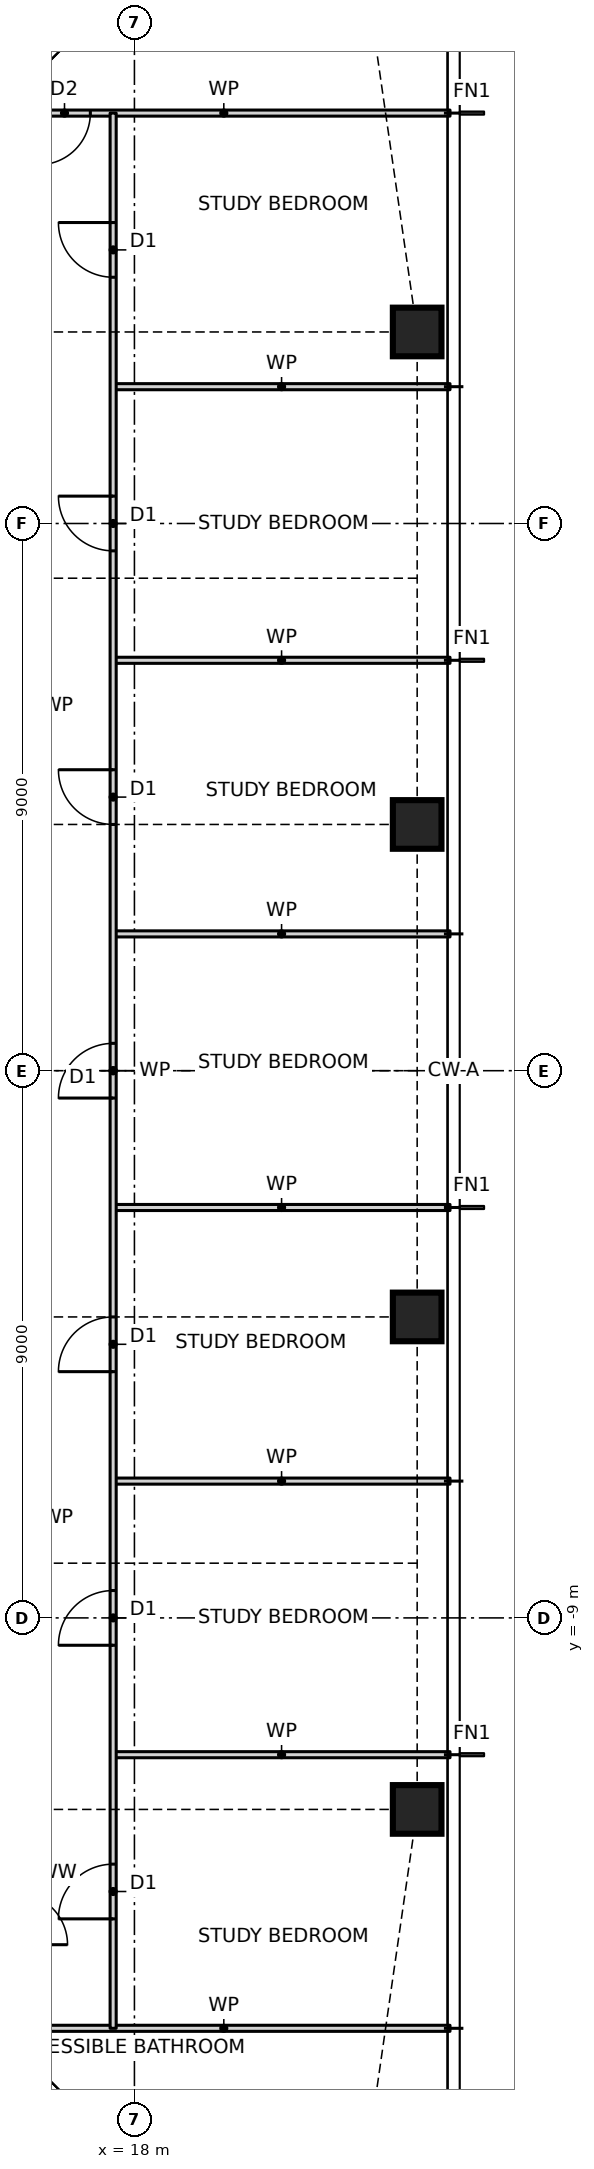
"""IFC4 building model, lengths in metres.
Left out: names, types, materials, properties, quantities, classifications, styles, units other than length and angle.
Written with IfcOpenShell. Run it as: python <this file> out.ifc"""

import sys

from ifc_helpers import new_model, si_unit, direction, frame, frame_2d, origin, origin_2d, place, context, subcontext, project, spatial, rectangle, hollow_rectangle, extrude, element, fill, save


model = new_model("IFC4")
c1 = context("Model", 3, precision=1e-05, world=origin(), true_north=direction((0.0, 1.0)))
c2 = subcontext(c1, "Body", "Model", "MODEL_VIEW")
j1 = project(units=[si_unit("LENGTHUNIT", "METRE"), si_unit("PLANEANGLEUNIT", "RADIAN")], contexts=[c1])
p1 = place(None, origin())
s1 = spatial("IfcSite", under=j1, at=p1, CompositionType="ELEMENT")
p2 = place(p1, origin())
s2 = spatial("IfcBuilding", under=s1, at=p2, CompositionType="ELEMENT")
p3 = place(p2, frame((0.0, 0.0, 22.0)))
s3 = spatial("IfcBuildingStorey", under=s2, at=p3, CompositionType="ELEMENT", Elevation=22.0)
for number, where, z_axis, x_axis in (
    (1, (22.65, -12.15, 0.0), (0.0, 0.0, 1.0), (1.0, 0.0, 0.0)),
    (2, (22.65, -4.05, 0.0), (0.0, 0.0, 1.0), (1.0, 0.0, 0.0)),
    (3, (22.65, 4.05, 0.0), (0.0, 0.0, 1.0), (1.0, 0.0, 0.0)),
    (4, (22.65, 12.15, 0.0), (0.0, 0.0, 1.0), (1.0, 0.0, 0.0)),
):
    element("IfcColumn", number, at=place(p3, frame(where, z_axis=z_axis, x_axis=x_axis)), inside=s3, PredefinedType="COLUMN", context=c2, shape_type="SweptSolid", body=[
        extrude(hollow_rectangle(XDim=0.8, YDim=0.8, WallThickness=0.09, at=origin_2d()), origin(), (0.0, 0.0, 1.0), 3.5),
    ])
p4 = place(p3, frame((15.75, -15.75, 0.0), z_axis=(0.0, 0.0, 1.0), x_axis=(1.0, 0.0, 0.0)))
e5 = element("IfcWall", 5, at=p4, inside=s3, PredefinedType="PARTITIONING", context=c2, shape_type="SweptSolid", body=[
    extrude(rectangle(XDim=7.44, YDim=0.1, at=frame_2d((3.72, 0.0))), origin(), (0.0, 0.0, 1.0), 3.27),
])
for number, where, z_axis, x_axis in (
    (6, (17.65, -11.25, 0.0), (0.0, 0.0, 1.0), (1.0, 0.0, 0.0)),
    (7, (17.65, -6.75, 0.0), (0.0, 0.0, 1.0), (1.0, 0.0, 0.0)),
    (8, (17.65, -2.25, 0.0), (0.0, 0.0, 1.0), (1.0, 0.0, 0.0)),
    (9, (17.65, 2.25, 0.0), (0.0, 0.0, 1.0), (1.0, 0.0, 0.0)),
    (10, (17.65, 6.75, 0.0), (0.0, 0.0, 1.0), (1.0, 0.0, 0.0)),
    (11, (17.65, 11.25, 0.0), (0.0, 0.0, 1.0), (1.0, 0.0, 0.0)),
):
    element("IfcWall", number, at=place(p3, frame(where, z_axis=z_axis, x_axis=x_axis)), inside=s3, PredefinedType="PARTITIONING", context=c2, shape_type="SweptSolid", body=[
        extrude(rectangle(XDim=5.54, YDim=0.1, at=frame_2d((2.77, 0.0))), origin(), (0.0, 0.0, 1.0), 3.27),
    ])
p5 = place(p3, frame((15.75, 15.75, 0.0), z_axis=(0.0, 0.0, 1.0), x_axis=(1.0, 0.0, 0.0)))
e12 = element("IfcWall", 12, at=p5, inside=s3, PredefinedType="PARTITIONING", context=c2, shape_type="SweptSolid", body=[
    extrude(rectangle(XDim=7.44, YDim=0.1, at=frame_2d((3.72, 0.0))), origin(), (0.0, 0.0, 1.0), 3.27),
])
p6 = place(p5, frame((0.675, 0.0, 0.0)))
e13 = element("IfcOpeningElement", 13, at=p6, cuts=e12, PredefinedType="OPENING", context=c2, shape_type="SweptSolid", body=[
    extrude(rectangle(XDim=0.85, YDim=2.1, at=frame_2d((0.425, 1.05))), frame((0.0, 0.06, 0.0), z_axis=(0.0, -1.0, 0.0), x_axis=(1.0, 0.0, 0.0)), (0.0, 0.0, 1.0), 0.12),
])
p7 = place(p3, frame((17.65, -15.75, 0.0), z_axis=(0.0, 0.0, 1.0), x_axis=(0.0, 1.0, 0.0)))
e14 = element("IfcWall", 14, at=p7, inside=s3, PredefinedType="PARTITIONING", context=c2, shape_type="SweptSolid", body=[
    extrude(rectangle(XDim=31.5, YDim=0.1, at=frame_2d((15.75, 0.0))), origin(), (0.0, 0.0, 1.0), 3.27),
])
p8 = place(p7, frame((1.8, 0.0, 0.0)))
e15 = element("IfcOpeningElement", 15, at=p8, cuts=e14, PredefinedType="OPENING", context=c2, shape_type="SweptSolid", body=[
    extrude(rectangle(XDim=0.9, YDim=2.1, at=frame_2d((0.45, 1.05))), frame((0.0, 0.06, 0.0), z_axis=(0.0, -1.0, 0.0), x_axis=(1.0, 0.0, 0.0)), (0.0, 0.0, 1.0), 0.12),
])
p9 = place(p7, frame((6.3, 0.0, 0.0)))
e16 = element("IfcOpeningElement", 16, at=p9, cuts=e14, PredefinedType="OPENING", context=c2, shape_type="SweptSolid", body=[
    extrude(rectangle(XDim=0.9, YDim=2.1, at=frame_2d((0.45, 1.05))), frame((0.0, 0.06, 0.0), z_axis=(0.0, -1.0, 0.0), x_axis=(1.0, 0.0, 0.0)), (0.0, 0.0, 1.0), 0.12),
])
p10 = place(p7, frame((10.8, 0.0, 0.0)))
e17 = element("IfcOpeningElement", 17, at=p10, cuts=e14, PredefinedType="OPENING", context=c2, shape_type="SweptSolid", body=[
    extrude(rectangle(XDim=0.9, YDim=2.1, at=frame_2d((0.45, 1.05))), frame((0.0, 0.06, 0.0), z_axis=(0.0, -1.0, 0.0), x_axis=(1.0, 0.0, 0.0)), (0.0, 0.0, 1.0), 0.12),
])
p11 = place(p7, frame((15.3, 0.0, 0.0)))
e18 = element("IfcOpeningElement", 18, at=p11, cuts=e14, PredefinedType="OPENING", context=c2, shape_type="SweptSolid", body=[
    extrude(rectangle(XDim=0.9, YDim=2.1, at=frame_2d((0.45, 1.05))), frame((0.0, 0.06, 0.0), z_axis=(0.0, -1.0, 0.0), x_axis=(1.0, 0.0, 0.0)), (0.0, 0.0, 1.0), 0.12),
])
p12 = place(p7, frame((19.8, 0.0, 0.0)))
e19 = element("IfcOpeningElement", 19, at=p12, cuts=e14, PredefinedType="OPENING", context=c2, shape_type="SweptSolid", body=[
    extrude(rectangle(XDim=0.9, YDim=2.1, at=frame_2d((0.45, 1.05))), frame((0.0, 0.06, 0.0), z_axis=(0.0, -1.0, 0.0), x_axis=(1.0, 0.0, 0.0)), (0.0, 0.0, 1.0), 0.12),
])
p13 = place(p7, frame((24.3, 0.0, 0.0)))
e20 = element("IfcOpeningElement", 20, at=p13, cuts=e14, PredefinedType="OPENING", context=c2, shape_type="SweptSolid", body=[
    extrude(rectangle(XDim=0.9, YDim=2.1, at=frame_2d((0.45, 1.05))), frame((0.0, 0.06, 0.0), z_axis=(0.0, -1.0, 0.0), x_axis=(1.0, 0.0, 0.0)), (0.0, 0.0, 1.0), 0.12),
])
p14 = place(p7, frame((28.8, 0.0, 0.0)))
e21 = element("IfcOpeningElement", 21, at=p14, cuts=e14, PredefinedType="OPENING", context=c2, shape_type="SweptSolid", body=[
    extrude(rectangle(XDim=0.9, YDim=2.1, at=frame_2d((0.45, 1.05))), frame((0.0, 0.06, 0.0), z_axis=(0.0, -1.0, 0.0), x_axis=(1.0, 0.0, 0.0)), (0.0, 0.0, 1.0), 0.12),
])
p15 = place(p8, origin())
e22 = element("IfcDoor", 22, at=p15, inside=s3, OperationType="SINGLE_SWING_LEFT", PredefinedType="DOOR", context=c2, shape_type="SweptSolid", body=[
    extrude(rectangle(XDim=0.9, YDim=2.1, at=frame_2d((0.45, 1.05))), frame((0.0, 0.025, 0.0), z_axis=(0.0, -1.0, 0.0), x_axis=(1.0, 0.0, 0.0)), (0.0, 0.0, 1.0), 0.05),
])
fill(e15, e22)
p16 = place(p9, origin())
e23 = element("IfcDoor", 23, at=p16, inside=s3, OperationType="SINGLE_SWING_LEFT", PredefinedType="DOOR", context=c2, shape_type="SweptSolid", body=[
    extrude(rectangle(XDim=0.9, YDim=2.1, at=frame_2d((0.45, 1.05))), frame((0.0, 0.025, 0.0), z_axis=(0.0, -1.0, 0.0), x_axis=(1.0, 0.0, 0.0)), (0.0, 0.0, 1.0), 0.05),
])
fill(e16, e23)
p17 = place(p10, origin())
e24 = element("IfcDoor", 24, at=p17, inside=s3, OperationType="SINGLE_SWING_LEFT", PredefinedType="DOOR", context=c2, shape_type="SweptSolid", body=[
    extrude(rectangle(XDim=0.9, YDim=2.1, at=frame_2d((0.45, 1.05))), frame((0.0, 0.025, 0.0), z_axis=(0.0, -1.0, 0.0), x_axis=(1.0, 0.0, 0.0)), (0.0, 0.0, 1.0), 0.05),
])
fill(e17, e24)
p18 = place(p11, origin())
e25 = element("IfcDoor", 25, at=p18, inside=s3, OperationType="SINGLE_SWING_LEFT", PredefinedType="DOOR", context=c2, shape_type="SweptSolid", body=[
    extrude(rectangle(XDim=0.9, YDim=2.1, at=frame_2d((0.45, 1.05))), frame((0.0, 0.025, 0.0), z_axis=(0.0, -1.0, 0.0), x_axis=(1.0, 0.0, 0.0)), (0.0, 0.0, 1.0), 0.05),
])
fill(e18, e25)
p19 = place(p12, origin())
e26 = element("IfcDoor", 26, at=p19, inside=s3, OperationType="SINGLE_SWING_RIGHT", PredefinedType="DOOR", context=c2, shape_type="SweptSolid", body=[
    extrude(rectangle(XDim=0.9, YDim=2.1, at=frame_2d((0.45, 1.05))), frame((0.0, 0.025, 0.0), z_axis=(0.0, -1.0, 0.0), x_axis=(1.0, 0.0, 0.0)), (0.0, 0.0, 1.0), 0.05),
])
fill(e19, e26)
p20 = place(p13, origin())
e27 = element("IfcDoor", 27, at=p20, inside=s3, OperationType="SINGLE_SWING_RIGHT", PredefinedType="DOOR", context=c2, shape_type="SweptSolid", body=[
    extrude(rectangle(XDim=0.9, YDim=2.1, at=frame_2d((0.45, 1.05))), frame((0.0, 0.025, 0.0), z_axis=(0.0, -1.0, 0.0), x_axis=(1.0, 0.0, 0.0)), (0.0, 0.0, 1.0), 0.05),
])
fill(e20, e27)
p21 = place(p14, origin())
e28 = element("IfcDoor", 28, at=p21, inside=s3, OperationType="SINGLE_SWING_RIGHT", PredefinedType="DOOR", context=c2, shape_type="SweptSolid", body=[
    extrude(rectangle(XDim=0.9, YDim=2.1, at=frame_2d((0.45, 1.05))), frame((0.0, 0.025, 0.0), z_axis=(0.0, -1.0, 0.0), x_axis=(1.0, 0.0, 0.0)), (0.0, 0.0, 1.0), 0.05),
])
fill(e21, e28)
p22 = place(p6, frame((0.85, 0.0, 0.0), z_axis=(0.0, 0.0, 1.0), x_axis=(-1.0, 0.0, 0.0)))
e29 = element("IfcDoor", 29, at=p22, inside=s3, OperationType="SINGLE_SWING_RIGHT", PredefinedType="DOOR", context=c2, shape_type="SweptSolid", body=[
    extrude(rectangle(XDim=0.85, YDim=2.1, at=frame_2d((0.425, 1.05))), frame((0.0, 0.025, 0.0), z_axis=(0.0, -1.0, 0.0), x_axis=(1.0, 0.0, 0.0)), (0.0, 0.0, 1.0), 0.05),
])
fill(e13, e29)
save(model, sys.argv[1])
